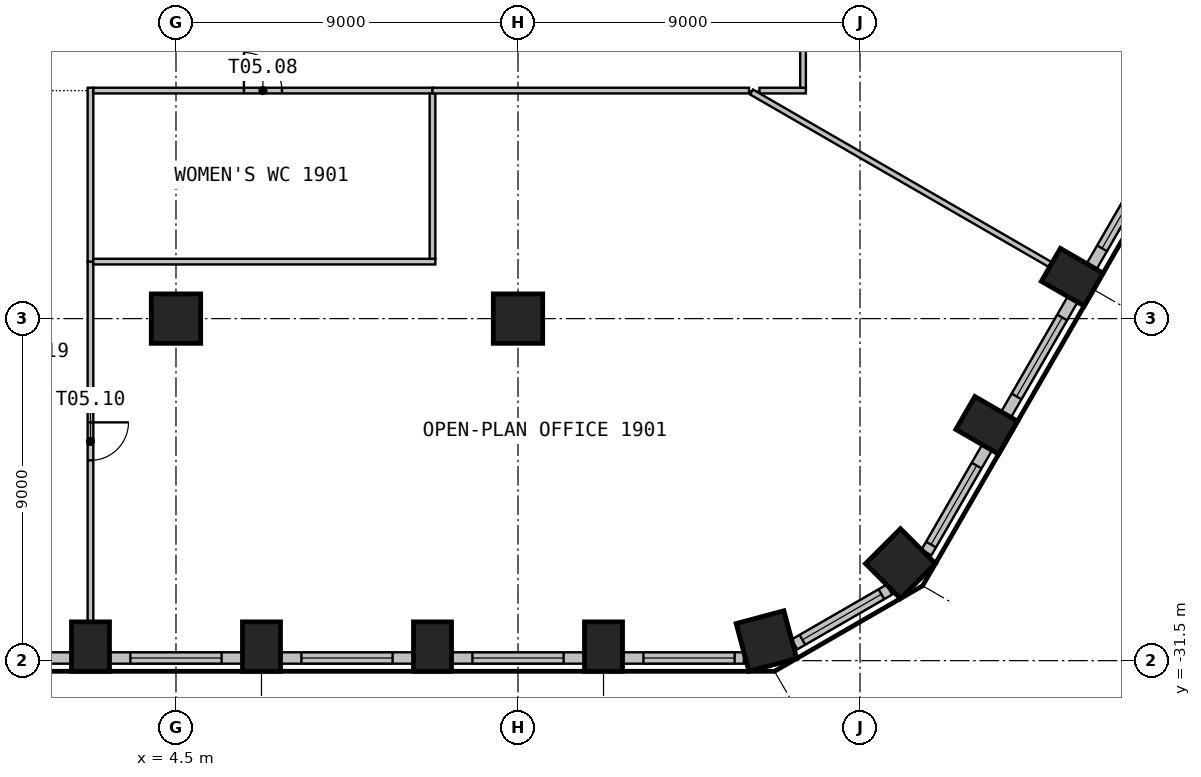
"""IFC4 building model, lengths in metres.
Left out: names, types, materials, properties, quantities, classifications, styles, units other than length and angle.
Written with IfcOpenShell. Run it as: python <this file> out.ifc"""

import sys

from ifc_helpers import new_model, si_unit, direction, frame, frame_2d, origin, origin_2d, place, context, subcontext, project, spatial, rectangle, circle, extrude, element, fill, save


model = new_model("IFC4")
c1 = context("Model", 3, precision=1e-05, world=origin(), true_north=direction((0.0, 1.0)))
c2 = subcontext(c1, "Body", "Model", "MODEL_VIEW")
j1 = project(units=[si_unit("LENGTHUNIT", "METRE"), si_unit("PLANEANGLEUNIT", "RADIAN")], contexts=[c1])
p1 = place(None, origin())
s1 = spatial("IfcSite", under=j1, at=p1, CompositionType="ELEMENT")
p2 = place(p1, origin())
s2 = spatial("IfcBuilding", under=s1, at=p2, CompositionType="ELEMENT")
p3 = place(p2, frame((0.0, 0.0, 81.3)))
s3 = spatial("IfcBuildingStorey", under=s2, at=p3, CompositionType="ELEMENT", Elevation=81.3)
for number, where, z_axis, x_axis in (
    (1, (2.25, -31.13, 0.0), (0.0, 0.0, 1.0), (1.0, 0.0, 0.0)),
    (2, (6.75, -31.13, 0.0), (0.0, 0.0, 1.0), (1.0, 0.0, 0.0)),
    (3, (11.25, -31.13, 0.0), (0.0, 0.0, 1.0), (1.0, 0.0, 0.0)),
    (4, (15.75, -31.13, 0.0), (0.0, 0.0, 1.0), (1.0, 0.0, 0.0)),
):
    element("IfcColumn", number, at=place(p3, frame(where, z_axis=z_axis, x_axis=x_axis)), inside=s3, PredefinedType="COLUMN", context=c2, shape_type="SweptSolid", body=[
        extrude(rectangle(XDim=1.0, YDim=1.3, at=origin_2d()), origin(), (0.0, 0.0, 1.0), 3.525),
    ])
for number, where, z_axis, x_axis in (
    (5, (20.037, -30.984, 0.0), (0.0, 0.0, 1.0), (0.966, 0.259, 0.0)),
    (6, (23.564, -28.947, 0.0), (0.0, 0.0, 1.0), (0.707, 0.707, 0.0)),
):
    element("IfcColumn", number, at=place(p3, frame(where, z_axis=z_axis, x_axis=x_axis)), inside=s3, PredefinedType="COLUMN", context=c2, shape_type="SweptSolid", body=[
        extrude(rectangle(XDim=1.3, YDim=1.3, at=origin_2d()), origin(), (0.0, 0.0, 1.0), 3.525),
    ])
for number, where, z_axis, x_axis in (
    (7, (25.834, -25.308, 0.0), (0.0, 0.0, 1.0), (0.5, 0.866, 0.0)),
    (8, (28.084, -21.411, 0.0), (0.0, 0.0, 1.0), (0.5, 0.866, 0.0)),
):
    element("IfcColumn", number, at=place(p3, frame(where, z_axis=z_axis, x_axis=x_axis)), inside=s3, PredefinedType="COLUMN", context=c2, shape_type="SweptSolid", body=[
        extrude(rectangle(XDim=1.0, YDim=1.3, at=origin_2d()), origin(), (0.0, 0.0, 1.0), 3.525),
    ])
for number, where, z_axis, x_axis in (
    (9, (4.5, -22.5, 0.0), (0.0, 0.0, 1.0), (1.0, 0.0, 0.0)),
    (10, (13.5, -22.5, 0.0), (0.0, 0.0, 1.0), (1.0, 0.0, 0.0)),
):
    element("IfcColumn", number, at=place(p3, frame(where, z_axis=z_axis, x_axis=x_axis)), inside=s3, PredefinedType="COLUMN", context=c2, shape_type="SweptSolid", body=[
        extrude(circle(Radius=0.65, at=origin_2d()), origin(), (0.0, 0.0, 1.0), 3.525),
    ])
p4 = place(p3, frame((-1.75, -31.43, 0.0), z_axis=(0.0, 0.0, 1.0), x_axis=(1.0, 0.0, 0.0)))
e11 = element("IfcWall", 11, at=p4, inside=s3, PredefinedType="SOLIDWALL", context=c2, shape_type="SweptSolid", body=[
    extrude(rectangle(XDim=3.499, YDim=0.3, at=frame_2d((1.75, 0.0))), origin(), (0.0, 0.0, 1.0), 3.525),
])
p5 = place(p4, frame((0.55, 0.0, 0.9)))
e12 = element("IfcOpeningElement", 12, at=p5, cuts=e11, PredefinedType="OPENING", context=c2, shape_type="SweptSolid", body=[
    extrude(rectangle(XDim=2.4, YDim=2.1, at=frame_2d((1.2, 1.05))), frame((0.0, 0.16, 0.0), z_axis=(0.0, -1.0, 0.0), x_axis=(1.0, 0.0, 0.0)), (0.0, 0.0, 1.0), 0.32),
])
p6 = place(p3, frame((2.75, -31.43, 0.0), z_axis=(0.0, 0.0, 1.0), x_axis=(1.0, 0.0, 0.0)))
e13 = element("IfcWall", 13, at=p6, inside=s3, PredefinedType="SOLIDWALL", context=c2, shape_type="SweptSolid", body=[
    extrude(rectangle(XDim=3.499, YDim=0.3, at=frame_2d((1.75, 0.0))), origin(), (0.0, 0.0, 1.0), 3.525),
])
p7 = place(p6, frame((0.55, 0.0, 0.9)))
e14 = element("IfcOpeningElement", 14, at=p7, cuts=e13, PredefinedType="OPENING", context=c2, shape_type="SweptSolid", body=[
    extrude(rectangle(XDim=2.4, YDim=2.1, at=frame_2d((1.2, 1.05))), frame((0.0, 0.16, 0.0), z_axis=(0.0, -1.0, 0.0), x_axis=(1.0, 0.0, 0.0)), (0.0, 0.0, 1.0), 0.32),
])
p8 = place(p3, frame((7.25, -31.43, 0.0), z_axis=(0.0, 0.0, 1.0), x_axis=(1.0, 0.0, 0.0)))
e15 = element("IfcWall", 15, at=p8, inside=s3, PredefinedType="SOLIDWALL", context=c2, shape_type="SweptSolid", body=[
    extrude(rectangle(XDim=3.499, YDim=0.3, at=frame_2d((1.75, 0.0))), origin(), (0.0, 0.0, 1.0), 3.525),
])
p9 = place(p8, frame((0.55, 0.0, 0.9)))
e16 = element("IfcOpeningElement", 16, at=p9, cuts=e15, PredefinedType="OPENING", context=c2, shape_type="SweptSolid", body=[
    extrude(rectangle(XDim=2.4, YDim=2.1, at=frame_2d((1.2, 1.05))), frame((0.0, 0.16, 0.0), z_axis=(0.0, -1.0, 0.0), x_axis=(1.0, 0.0, 0.0)), (0.0, 0.0, 1.0), 0.32),
])
p10 = place(p3, frame((11.75, -31.43, 0.0), z_axis=(0.0, 0.0, 1.0), x_axis=(1.0, 0.0, 0.0)))
e17 = element("IfcWall", 17, at=p10, inside=s3, PredefinedType="SOLIDWALL", context=c2, shape_type="SweptSolid", body=[
    extrude(rectangle(XDim=3.499, YDim=0.3, at=frame_2d((1.75, 0.0))), origin(), (0.0, 0.0, 1.0), 3.525),
])
p11 = place(p10, frame((0.55, 0.0, 0.9)))
e18 = element("IfcOpeningElement", 18, at=p11, cuts=e17, PredefinedType="OPENING", context=c2, shape_type="SweptSolid", body=[
    extrude(rectangle(XDim=2.4, YDim=2.1, at=frame_2d((1.2, 1.05))), frame((0.0, 0.16, 0.0), z_axis=(0.0, -1.0, 0.0), x_axis=(1.0, 0.0, 0.0)), (0.0, 0.0, 1.0), 0.32),
])
p12 = place(p3, frame((16.25, -31.43, 0.0), z_axis=(0.0, 0.0, 1.0), x_axis=(1.0, 0.0, 0.0)))
e19 = element("IfcWall", 19, at=p12, inside=s3, PredefinedType="SOLIDWALL", context=c2, shape_type="SweptSolid", body=[
    extrude(rectangle(XDim=3.192, YDim=0.3, at=frame_2d((1.596, 0.0))), origin(), (0.0, 0.0, 1.0), 3.525),
])
p13 = place(p12, frame((0.55, 0.0, 0.9)))
e20 = element("IfcOpeningElement", 20, at=p13, cuts=e19, PredefinedType="OPENING", context=c2, shape_type="SweptSolid", body=[
    extrude(rectangle(XDim=2.4, YDim=2.1, at=frame_2d((1.2, 1.05))), frame((0.0, 0.16, 0.0), z_axis=(0.0, -1.0, 0.0), x_axis=(1.0, 0.0, 0.0)), (0.0, 0.0, 1.0), 0.32),
])
p14 = place(p3, frame((20.774, -31.073, 0.0), z_axis=(0.0, 0.0, 1.0), x_axis=(0.866053149362, 0.49995194017, 0.0)))
e21 = element("IfcWall", 21, at=p14, inside=s3, PredefinedType="SOLIDWALL", context=c2, shape_type="SweptSolid", body=[
    extrude(rectangle(XDim=2.885, YDim=0.3, at=frame_2d((1.443, 0.0))), origin(), (0.0, 0.0, 1.0), 3.525),
])
p15 = place(p14, frame((0.243, 0.0, 0.9)))
e22 = element("IfcOpeningElement", 22, at=p15, cuts=e21, PredefinedType="OPENING", context=c2, shape_type="SweptSolid", body=[
    extrude(rectangle(XDim=2.4, YDim=2.1, at=frame_2d((1.2, 1.05))), frame((0.0, 0.16, 0.0), z_axis=(0.0, -1.0, 0.0), x_axis=(1.0, 0.0, 0.0)), (0.0, 0.0, 1.0), 0.32),
])
p16 = place(p3, frame((24.248, -28.656, 0.0), z_axis=(0.0, 0.0, 1.0), x_axis=(0.500004907028, 0.866022570692, 0.0)))
e23 = element("IfcWall", 23, at=p16, inside=s3, PredefinedType="SOLIDWALL", context=c2, shape_type="SweptSolid", body=[
    extrude(rectangle(XDim=3.192, YDim=0.3, at=frame_2d((1.596, 0.0))), origin(), (0.0, 0.0, 1.0), 3.525),
])
p17 = place(p16, frame((0.243, 0.0, 0.9)))
e24 = element("IfcOpeningElement", 24, at=p17, cuts=e23, PredefinedType="OPENING", context=c2, shape_type="SweptSolid", body=[
    extrude(rectangle(XDim=2.4, YDim=2.1, at=frame_2d((1.2, 1.05))), frame((0.0, 0.16, 0.0), z_axis=(0.0, -1.0, 0.0), x_axis=(1.0, 0.0, 0.0)), (0.0, 0.0, 1.0), 0.32),
])
p18 = place(p3, frame((26.344, -25.024, 0.0), z_axis=(0.0, 0.0, 1.0), x_axis=(0.499996256241, 0.866027565234, 0.0)))
e25 = element("IfcWall", 25, at=p18, inside=s3, PredefinedType="SOLIDWALL", context=c2, shape_type="SweptSolid", body=[
    extrude(rectangle(XDim=3.499, YDim=0.3, at=frame_2d((1.75, 0.0))), origin(), (0.0, 0.0, 1.0), 3.525),
])
p19 = place(p18, frame((0.55, 0.0, 0.9)))
e26 = element("IfcOpeningElement", 26, at=p19, cuts=e25, PredefinedType="OPENING", context=c2, shape_type="SweptSolid", body=[
    extrude(rectangle(XDim=2.4, YDim=2.1, at=frame_2d((1.2, 1.05))), frame((0.0, 0.16, 0.0), z_axis=(0.0, -1.0, 0.0), x_axis=(1.0, 0.0, 0.0)), (0.0, 0.0, 1.0), 0.32),
])
p20 = place(p3, frame((28.594, -21.127, 0.0), z_axis=(0.0, 0.0, 1.0), x_axis=(0.499996256241, 0.866027565234, 0.0)))
e27 = element("IfcWall", 27, at=p20, inside=s3, PredefinedType="SOLIDWALL", context=c2, shape_type="SweptSolid", body=[
    extrude(rectangle(XDim=3.499, YDim=0.3, at=frame_2d((1.75, 0.0))), origin(), (0.0, 0.0, 1.0), 3.525),
])
p21 = place(p20, frame((0.55, 0.0, 0.9)))
e28 = element("IfcOpeningElement", 28, at=p21, cuts=e27, PredefinedType="OPENING", context=c2, shape_type="SweptSolid", body=[
    extrude(rectangle(XDim=2.4, YDim=2.1, at=frame_2d((1.2, 1.05))), frame((0.0, 0.16, 0.0), z_axis=(0.0, -1.0, 0.0), x_axis=(1.0, 0.0, 0.0)), (0.0, 0.0, 1.0), 0.32),
])
p22 = place(p3, frame((2.25, -21.0, 0.0), z_axis=(0.0, 0.0, 1.0), x_axis=(0.0, -1.0, 0.0)))
e29 = element("IfcWall", 29, at=p22, inside=s3, PredefinedType="PARTITIONING", context=c2, shape_type="SweptSolid", body=[
    extrude(rectangle(XDim=9.46, YDim=0.15, at=frame_2d((4.73, 0.0))), origin(), (0.0, 0.0, 1.0), 3.525),
])
p23 = place(p22, frame((4.23, 0.0, 0.0)))
e30 = element("IfcOpeningElement", 30, at=p23, cuts=e29, PredefinedType="OPENING", context=c2, shape_type="SweptSolid", body=[
    extrude(rectangle(XDim=1.0, YDim=2.1, at=frame_2d((0.5, 1.05))), frame((0.0, 0.085, 0.0), z_axis=(0.0, -1.0, 0.0), x_axis=(1.0, 0.0, 0.0)), (0.0, 0.0, 1.0), 0.17),
])
p24 = place(p3, frame((2.25, -16.425, 0.0), z_axis=(0.0, 0.0, 1.0), x_axis=(0.0, -1.0, 0.0)))
e31 = element("IfcWall", 31, at=p24, inside=s3, PredefinedType="PARTITIONING", context=c2, shape_type="SweptSolid", body=[
    extrude(rectangle(XDim=4.575, YDim=0.15, at=frame_2d((2.288, 0.0))), origin(), (0.0, 0.0, 1.0), 3.525),
])
p25 = place(p3, frame((11.325, -21.0, 0.0), z_axis=(0.0, 0.0, 1.0), x_axis=(-1.0, 0.0, 0.0)))
e32 = element("IfcWall", 32, at=p25, inside=s3, PredefinedType="PARTITIONING", context=c2, shape_type="SweptSolid", body=[
    extrude(rectangle(XDim=9.0, YDim=0.15, at=frame_2d((4.5, 0.0))), origin(), (0.0, 0.0, 1.0), 3.525),
])
p26 = place(p3, frame((2.325, -16.5, 0.0), z_axis=(0.0, 0.0, 1.0), x_axis=(1.0, 0.0, 0.0)))
e33 = element("IfcWall", 33, at=p26, inside=s3, PredefinedType="PARTITIONING", context=c2, shape_type="SweptSolid", body=[
    extrude(rectangle(XDim=8.925, YDim=0.15, at=frame_2d((4.462, 0.0))), origin(), (0.0, 0.0, 1.0), 3.525),
])
p27 = place(p26, frame((3.962, 0.0, 0.0)))
e34 = element("IfcOpeningElement", 34, at=p27, cuts=e33, PredefinedType="OPENING", context=c2, shape_type="SweptSolid", body=[
    extrude(rectangle(XDim=1.0, YDim=2.1, at=frame_2d((0.5, 1.05))), frame((0.0, 0.085, 0.0), z_axis=(0.0, -1.0, 0.0), x_axis=(1.0, 0.0, 0.0)), (0.0, 0.0, 1.0), 0.17),
])
p28 = place(p3, frame((11.25, -16.575, 0.0), z_axis=(0.0, 0.0, 1.0), x_axis=(0.0, -1.0, 0.0)))
e35 = element("IfcWall", 35, at=p28, inside=s3, PredefinedType="PARTITIONING", context=c2, shape_type="SweptSolid", body=[
    extrude(rectangle(XDim=4.35, YDim=0.15, at=frame_2d((2.175, 0.0))), origin(), (0.0, 0.0, 1.0), 3.525),
])
p29 = place(p3, frame((11.25, -16.5, 0.0), z_axis=(0.0, 0.0, 1.0), x_axis=(1.0, 0.0, 0.0)))
e36 = element("IfcWall", 36, at=p29, inside=s3, PredefinedType="PARTITIONING", context=c2, shape_type="SweptSolid", body=[
    extrude(rectangle(XDim=8.329, YDim=0.15, at=frame_2d((4.165, 0.0))), origin(), (0.0, 0.0, 1.0), 3.525),
])
p30 = place(p3, frame((19.854, -16.5, 0.0), z_axis=(0.0, 0.0, 1.0), x_axis=(1.0, 0.0, 0.0)))
e37 = element("IfcWall", 37, at=p30, inside=s3, PredefinedType="PARTITIONING", context=c2, shape_type="SweptSolid", body=[
    extrude(rectangle(XDim=1.221, YDim=0.15, at=frame_2d((0.61, 0.0))), origin(), (0.0, 0.0, 1.0), 3.525),
])
p31 = place(p3, frame((19.644, -16.538, 0.0), z_axis=(0.0, 0.0, 1.0), x_axis=(0.866004606565, -0.500036020111, 0.0)))
e38 = element("IfcWall", 38, at=p31, inside=s3, PredefinedType="PARTITIONING", context=c2, shape_type="SweptSolid", body=[
    extrude(rectangle(XDim=9.076, YDim=0.15, at=frame_2d((4.538, 0.0))), origin(), (0.0, 0.0, 1.0), 3.525),
])
p32 = place(p3, frame((21.0, -16.425, 0.0), z_axis=(0.0, 0.0, 1.0), x_axis=(0.0, 1.0, 0.0)))
e39 = element("IfcWall", 39, at=p32, inside=s3, PredefinedType="PARTITIONING", context=c2, shape_type="SweptSolid", body=[
    extrude(rectangle(XDim=14.25, YDim=0.15, at=frame_2d((7.125, 0.0))), origin(), (0.0, 0.0, 1.0), 3.525),
])
p33 = place(p32, frame((6.625, 0.0, 0.0)))
e40 = element("IfcOpeningElement", 40, at=p33, cuts=e39, PredefinedType="OPENING", context=c2, shape_type="SweptSolid", body=[
    extrude(rectangle(XDim=1.0, YDim=2.1, at=frame_2d((0.5, 1.05))), frame((0.0, 0.085, 0.0), z_axis=(0.0, -1.0, 0.0), x_axis=(1.0, 0.0, 0.0)), (0.0, 0.0, 1.0), 0.17),
])
p34 = place(p7, origin())
e41 = element("IfcWindow", 41, at=p34, inside=s3, PartitioningType="SINGLE_PANEL", PredefinedType="WINDOW", context=c2, shape_type="SweptSolid", body=[
    extrude(rectangle(XDim=2.4, YDim=2.1, at=frame_2d((1.2, 1.05))), frame((0.0, 0.03, 0.0), z_axis=(0.0, -1.0, 0.0), x_axis=(1.0, 0.0, 0.0)), (0.0, 0.0, 1.0), 0.06),
])
fill(e14, e41)
p35 = place(p9, origin())
e42 = element("IfcWindow", 42, at=p35, inside=s3, PartitioningType="SINGLE_PANEL", PredefinedType="WINDOW", context=c2, shape_type="SweptSolid", body=[
    extrude(rectangle(XDim=2.4, YDim=2.1, at=frame_2d((1.2, 1.05))), frame((0.0, 0.03, 0.0), z_axis=(0.0, -1.0, 0.0), x_axis=(1.0, 0.0, 0.0)), (0.0, 0.0, 1.0), 0.06),
])
fill(e16, e42)
p36 = place(p11, origin())
e43 = element("IfcWindow", 43, at=p36, inside=s3, PartitioningType="SINGLE_PANEL", PredefinedType="WINDOW", context=c2, shape_type="SweptSolid", body=[
    extrude(rectangle(XDim=2.4, YDim=2.1, at=frame_2d((1.2, 1.05))), frame((0.0, 0.03, 0.0), z_axis=(0.0, -1.0, 0.0), x_axis=(1.0, 0.0, 0.0)), (0.0, 0.0, 1.0), 0.06),
])
fill(e18, e43)
p37 = place(p13, origin())
e44 = element("IfcWindow", 44, at=p37, inside=s3, PartitioningType="SINGLE_PANEL", PredefinedType="WINDOW", context=c2, shape_type="SweptSolid", body=[
    extrude(rectangle(XDim=2.4, YDim=2.1, at=frame_2d((1.2, 1.05))), frame((0.0, 0.03, 0.0), z_axis=(0.0, -1.0, 0.0), x_axis=(1.0, 0.0, 0.0)), (0.0, 0.0, 1.0), 0.06),
])
fill(e20, e44)
p38 = place(p15, origin())
e45 = element("IfcWindow", 45, at=p38, inside=s3, PartitioningType="SINGLE_PANEL", PredefinedType="WINDOW", context=c2, shape_type="SweptSolid", body=[
    extrude(rectangle(XDim=2.4, YDim=2.1, at=frame_2d((1.2, 1.05))), frame((0.0, 0.03, 0.0), z_axis=(0.0, -1.0, 0.0), x_axis=(1.0, 0.0, 0.0)), (0.0, 0.0, 1.0), 0.06),
])
fill(e22, e45)
p39 = place(p17, origin())
e46 = element("IfcWindow", 46, at=p39, inside=s3, PartitioningType="SINGLE_PANEL", PredefinedType="WINDOW", context=c2, shape_type="SweptSolid", body=[
    extrude(rectangle(XDim=2.4, YDim=2.1, at=frame_2d((1.2, 1.05))), frame((0.0, 0.03, 0.0), z_axis=(0.0, -1.0, 0.0), x_axis=(1.0, 0.0, 0.0)), (0.0, 0.0, 1.0), 0.06),
])
fill(e24, e46)
p40 = place(p19, origin())
e47 = element("IfcWindow", 47, at=p40, inside=s3, PartitioningType="SINGLE_PANEL", PredefinedType="WINDOW", context=c2, shape_type="SweptSolid", body=[
    extrude(rectangle(XDim=2.4, YDim=2.1, at=frame_2d((1.2, 1.05))), frame((0.0, 0.03, 0.0), z_axis=(0.0, -1.0, 0.0), x_axis=(1.0, 0.0, 0.0)), (0.0, 0.0, 1.0), 0.06),
])
fill(e26, e47)
p41 = place(p21, origin())
e48 = element("IfcWindow", 48, at=p41, inside=s3, PartitioningType="SINGLE_PANEL", PredefinedType="WINDOW", context=c2, shape_type="SweptSolid", body=[
    extrude(rectangle(XDim=2.4, YDim=2.1, at=frame_2d((1.2, 1.05))), frame((0.0, 0.03, 0.0), z_axis=(0.0, -1.0, 0.0), x_axis=(1.0, 0.0, 0.0)), (0.0, 0.0, 1.0), 0.06),
])
fill(e28, e48)
p42 = place(p27, origin())
e49 = element("IfcDoor", 49, at=p42, inside=s3, OperationType="SINGLE_SWING_LEFT", PredefinedType="DOOR", context=c2, shape_type="SweptSolid", body=[
    extrude(rectangle(XDim=1.0, YDim=2.1, at=frame_2d((0.5, 1.05))), frame((0.0, 0.025, 0.0), z_axis=(0.0, -1.0, 0.0), x_axis=(1.0, 0.0, 0.0)), (0.0, 0.0, 1.0), 0.05),
])
fill(e34, e49)
p43 = place(p23, origin())
e50 = element("IfcDoor", 50, at=p43, inside=s3, OperationType="SINGLE_SWING_LEFT", PredefinedType="DOOR", context=c2, shape_type="SweptSolid", body=[
    extrude(rectangle(XDim=1.0, YDim=2.1, at=frame_2d((0.5, 1.05))), frame((0.0, 0.025, 0.0), z_axis=(0.0, -1.0, 0.0), x_axis=(1.0, 0.0, 0.0)), (0.0, 0.0, 1.0), 0.05),
])
fill(e30, e50)
save(model, sys.argv[1])
